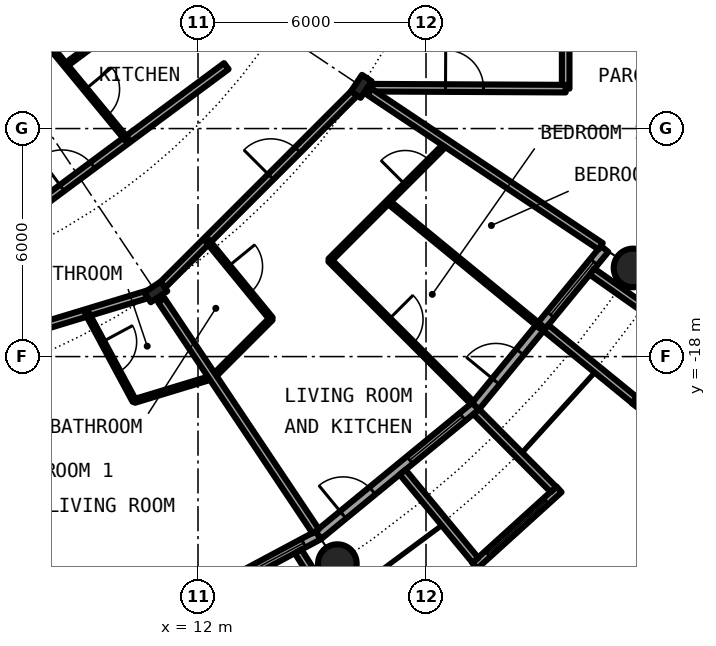
"""IFC4 building model, lengths in metres.
Left out: names, types, materials, properties, quantities, classifications, styles, units other than length and angle.
Written with IfcOpenShell. Run it as: python <this file> out.ifc"""

import sys

from ifc_helpers import new_model, si_unit, direction, frame, frame_2d, origin, origin_2d, place, context, subcontext, project, spatial, rectangle, circle, hollow_circle, i_section, extrude, element, fill, save


model = new_model("IFC4")
c1 = context("Model", 3, precision=1e-05, world=origin(), true_north=direction((0.0, 1.0)))
c2 = subcontext(c1, "Body", "Model", "MODEL_VIEW")
j1 = project(units=[si_unit("LENGTHUNIT", "METRE"), si_unit("PLANEANGLEUNIT", "RADIAN")], contexts=[c1])
p1 = place(None, origin())
s1 = spatial("IfcSite", under=j1, at=p1, CompositionType="ELEMENT")
p2 = place(p1, origin())
s2 = spatial("IfcBuilding", under=s1, at=p2, CompositionType="ELEMENT")
p3 = place(p2, frame((0.0, 0.0, 88.0)))
s3 = spatial("IfcBuildingStorey", under=s2, at=p3, CompositionType="ELEMENT", Elevation=88.0)
for number, where, z_axis, x_axis in (
    (1, (15.667, -23.448, 0.0), (0.0, 0.0, 1.0), (1.0, 0.0, 0.0)),
    (2, (23.448, -15.667, 0.0), (0.0, 0.0, 1.0), (1.0, 0.0, 0.0)),
):
    element("IfcColumn", number, at=place(p3, frame(where, z_axis=z_axis, x_axis=x_axis)), inside=s3, PredefinedType="COLUMN", context=c2, shape_type="SweptSolid", body=[
        extrude(hollow_circle(Radius=0.508, WallThickness=0.04, at=origin_2d()), origin(), (0.0, 0.0, 1.0), 3.05),
    ])
for number, where, z_axis, x_axis in (
    (3, (10.889, -16.297, 0.0), (0.0, 0.0, 1.0), (0.556, -0.831, 0.0)),
    (4, (16.297, -10.889, 0.0), (0.0, 0.0, 1.0), (0.831, -0.556, 0.0)),
):
    element("IfcColumn", number, at=place(p3, frame(where, z_axis=z_axis, x_axis=x_axis)), inside=s3, PredefinedType="COLUMN", context=c2, shape_type="SweptSolid", body=[
        extrude(i_section(OverallWidth=0.306, OverallDepth=0.524, WebThickness=0.021, FlangeThickness=0.04, FilletRadius=0.027, at=origin_2d()), origin(), (0.0, 0.0, 1.0), 3.05),
    ])
p4 = place(p3, frame((10.447, -25.222, 0.0), z_axis=(0.0, 0.0, 1.0), x_axis=(0.881915646801, 0.471407246368, 0.0)))
e5 = element("IfcWall", 5, at=p4, inside=s3, PredefinedType="SOLIDWALL", context=c2, shape_type="SweptSolid", body=[
    extrude(rectangle(XDim=5.352, YDim=0.25, at=frame_2d((2.676, 0.0))), origin(), (0.0, 0.0, 1.0), 2.7),
])
p5 = place(p4, frame((0.841, 0.0, 0.0)))
e6 = element("IfcOpeningElement", 6, at=p5, cuts=e5, PredefinedType="OPENING", context=c2, shape_type="SweptSolid", body=[
    extrude(rectangle(XDim=1.0, YDim=2.2, at=frame_2d((0.5, 1.1))), frame((0.0, 0.135, 0.0), z_axis=(0.0, -1.0, 0.0), x_axis=(1.0, 0.0, 0.0)), (0.0, 0.0, 1.0), 0.27),
])
p6 = place(p4, frame((3.111, 0.0, 0.3)))
e7 = element("IfcOpeningElement", 7, at=p6, cuts=e5, PredefinedType="OPENING", context=c2, shape_type="SweptSolid", body=[
    extrude(rectangle(XDim=1.8, YDim=2.1, at=frame_2d((0.9, 1.05))), frame((0.0, 0.135, 0.0), z_axis=(0.0, -1.0, 0.0), x_axis=(1.0, 0.0, 0.0)), (0.0, 0.0, 1.0), 0.27),
])
p7 = place(p3, frame((14.635, -23.126, -0.03), z_axis=(0.0, 0.0, 1.0), x_axis=(0.534437802731, -0.845207805816, 0.0)))
e8 = element("IfcWall", 8, at=p7, inside=s3, PredefinedType="SOLIDWALL", context=c2, shape_type="SweptSolid", body=[
    extrude(rectangle(XDim=2.932, YDim=0.2, at=frame_2d((1.466, 0.0))), origin(), (0.0, 0.0, 1.0), 2.73),
])
p8 = place(p3, frame((15.167, -22.699, 0.0), z_axis=(0.0, 0.0, 1.0), x_axis=(0.773019449054, 0.634382322723, 0.0)))
e9 = element("IfcWall", 9, at=p8, inside=s3, PredefinedType="SOLIDWALL", context=c2, shape_type="SweptSolid", body=[
    extrude(rectangle(XDim=5.352, YDim=0.25, at=frame_2d((2.676, 0.0))), origin(), (0.0, 0.0, 1.0), 2.7),
])
p9 = place(p8, frame((0.841, 0.0, 0.0)))
e10 = element("IfcOpeningElement", 10, at=p9, cuts=e9, PredefinedType="OPENING", context=c2, shape_type="SweptSolid", body=[
    extrude(rectangle(XDim=1.0, YDim=2.2, at=frame_2d((0.5, 1.1))), frame((0.0, 0.135, 0.0), z_axis=(0.0, -1.0, 0.0), x_axis=(1.0, 0.0, 0.0)), (0.0, 0.0, 1.0), 0.27),
])
p10 = place(p8, frame((3.111, 0.0, 0.3)))
e11 = element("IfcOpeningElement", 11, at=p10, cuts=e9, PredefinedType="OPENING", context=c2, shape_type="SweptSolid", body=[
    extrude(rectangle(XDim=1.8, YDim=2.1, at=frame_2d((0.9, 1.05))), frame((0.0, 0.135, 0.0), z_axis=(0.0, -1.0, 0.0), x_axis=(1.0, 0.0, 0.0)), (0.0, 0.0, 1.0), 0.27),
])
p11 = place(p3, frame((19.282, -23.503, -0.03), z_axis=(0.0, 0.0, 1.0), x_axis=(0.740998365753, 0.671506829416, 0.0)))
e12 = element("IfcWall", 12, at=p11, inside=s3, PredefinedType="SOLIDWALL", context=c2, shape_type="SweptSolid", body=[
    extrude(rectangle(XDim=2.993, YDim=0.2, at=frame_2d((1.497, 0.0))), origin(), (0.0, 0.0, 1.0), 2.73),
])
p12 = place(p11, frame((0.457, 0.0, 0.33)))
e13 = element("IfcOpeningElement", 13, at=p12, cuts=e12, PredefinedType="OPENING", context=c2, shape_type="SweptSolid", body=[
    extrude(circle(Radius=1.04, at=frame_2d((1.04, 1.04))), frame((0.0, 0.11, 0.0), z_axis=(0.0, -1.0, 0.0), x_axis=(1.0, 0.0, 0.0)), (0.0, 0.0, 1.0), 0.22),
])
p13 = place(p3, frame((17.384, -21.041, -0.03), z_axis=(0.0, 0.0, 1.0), x_axis=(0.63709551667, -0.770784861449, 0.0)))
e14 = element("IfcWall", 14, at=p13, inside=s3, PredefinedType="SOLIDWALL", context=c2, shape_type="SweptSolid", body=[
    extrude(rectangle(XDim=3.006, YDim=0.2, at=frame_2d((1.503, 0.0))), origin(), (0.0, 0.0, 1.0), 2.73),
])
p14 = place(p3, frame((19.323, -19.45, -0.03), z_axis=(0.0, 0.0, 1.0), x_axis=(0.704476739375, -0.709727076896, 0.0)))
e15 = element("IfcWall", 15, at=p14, inside=s3, PredefinedType="SOLIDWALL", context=c2, shape_type="SweptSolid", body=[
    extrude(rectangle(XDim=2.883, YDim=0.2, at=frame_2d((1.441, 0.0))), origin(), (0.0, 0.0, 1.0), 2.73),
])
p15 = place(p3, frame((19.304, -19.304, 0.0), z_axis=(0.0, 0.0, 1.0), x_axis=(0.634382322723, 0.773019449054, 0.0)))
e16 = element("IfcWall", 16, at=p15, inside=s3, PredefinedType="SOLIDWALL", context=c2, shape_type="SweptSolid", body=[
    extrude(rectangle(XDim=5.352, YDim=0.25, at=frame_2d((2.676, 0.0))), origin(), (0.0, 0.0, 1.0), 2.7),
])
p16 = place(p15, frame((0.841, 0.0, 0.0)))
e17 = element("IfcOpeningElement", 17, at=p16, cuts=e16, PredefinedType="OPENING", context=c2, shape_type="SweptSolid", body=[
    extrude(rectangle(XDim=1.0, YDim=2.2, at=frame_2d((0.5, 1.1))), frame((0.0, 0.135, 0.0), z_axis=(0.0, -1.0, 0.0), x_axis=(1.0, 0.0, 0.0)), (0.0, 0.0, 1.0), 0.27),
])
p17 = place(p15, frame((3.111, 0.0, 0.3)))
e18 = element("IfcOpeningElement", 18, at=p17, cuts=e16, PredefinedType="OPENING", context=c2, shape_type="SweptSolid", body=[
    extrude(rectangle(XDim=1.8, YDim=2.1, at=frame_2d((0.9, 1.05))), frame((0.0, 0.135, 0.0), z_axis=(0.0, -1.0, 0.0), x_axis=(1.0, 0.0, 0.0)), (0.0, 0.0, 1.0), 0.27),
])
p18 = place(p3, frame((23.497, -19.289, -0.03), z_axis=(0.0, 0.0, 1.0), x_axis=(0.60418752353, 0.796842165306, 0.0)))
e19 = element("IfcWall", 19, at=p18, inside=s3, PredefinedType="SOLIDWALL", context=c2, shape_type="SweptSolid", body=[
    extrude(rectangle(XDim=2.337, YDim=0.2, at=frame_2d((1.168, 0.0))), origin(), (0.0, 0.0, 1.0), 2.73),
])
p19 = place(p18, frame((0.128, 0.0, 0.33)))
e20 = element("IfcOpeningElement", 20, at=p19, cuts=e19, PredefinedType="OPENING", context=c2, shape_type="SweptSolid", body=[
    extrude(circle(Radius=1.04, at=frame_2d((1.04, 1.04))), frame((0.0, 0.11, 0.0), z_axis=(0.0, -1.0, 0.0), x_axis=(1.0, 0.0, 0.0)), (0.0, 0.0, 1.0), 0.22),
])
p20 = place(p3, frame((21.155, -17.246, -0.03), z_axis=(0.0, 0.0, 1.0), x_axis=(0.775179004516, -0.631741648902, 0.0)))
e21 = element("IfcWall", 21, at=p20, inside=s3, PredefinedType="SOLIDWALL", context=c2, shape_type="SweptSolid", body=[
    extrude(rectangle(XDim=3.006, YDim=0.2, at=frame_2d((1.503, 0.0))), origin(), (0.0, 0.0, 1.0), 2.73),
])
p21 = place(p3, frame((22.37, -15.765, -0.03), z_axis=(0.0, 0.0, 1.0), x_axis=(0.817256123454, -0.576274612209, 0.0)))
e22 = element("IfcWall", 22, at=p21, inside=s3, PredefinedType="SOLIDWALL", context=c2, shape_type="SweptSolid", body=[
    extrude(rectangle(XDim=2.933, YDim=0.2, at=frame_2d((1.466, 0.0))), origin(), (0.0, 0.0, 1.0), 2.73),
])
p22 = place(p3, frame((12.389, -18.542, 0.0), z_axis=(0.0, 0.0, 1.0), x_axis=(0.707106781187, 0.707106781187, 0.0)))
e23 = element("IfcWall", 23, at=p22, inside=s3, PredefinedType="PARTITIONING", context=c2, shape_type="SweptSolid", body=[
    extrude(rectangle(XDim=2.175, YDim=0.1, at=frame_2d((1.088, 0.0))), origin(), (0.0, 0.0, 1.0), 2.7),
])
p23 = place(p3, frame((15.468, -15.463, 0.0), z_axis=(0.0, 0.0, 1.0), x_axis=(0.707106781187, 0.707106781187, 0.0)))
e24 = element("IfcWall", 24, at=p23, inside=s3, PredefinedType="PARTITIONING", context=c2, shape_type="SweptSolid", body=[
    extrude(rectangle(XDim=4.351, YDim=0.1, at=frame_2d((2.176, 0.0))), origin(), (0.0, 0.0, 1.0), 2.7),
])
p24 = place(p23, frame((2.808, 0.0, 0.0)))
e25 = element("IfcOpeningElement", 25, at=p24, cuts=e24, PredefinedType="OPENING", context=c2, shape_type="SweptSolid", body=[
    extrude(rectangle(XDim=0.9, YDim=2.3, at=frame_2d((0.45, 1.15))), frame((0.0, 0.06, 0.0), z_axis=(0.0, -1.0, 0.0), x_axis=(1.0, 0.0, 0.0)), (0.0, 0.0, 1.0), 0.12),
])
p25 = place(p3, frame((21.675, -10.95, 0.0), z_axis=(0.0, 0.0, 1.0), x_axis=(0.0, 1.0, 0.0)))
e26 = element("IfcWall", 26, at=p25, inside=s3, PredefinedType="PARTITIONING", context=c2, shape_type="SweptSolid", body=[
    extrude(rectangle(XDim=1.65, YDim=0.2, at=frame_2d((0.825, 0.0))), origin(), (0.0, 0.0, 1.0), 2.7),
])
p26 = place(p3, frame((10.327, -19.168, 0.0), z_axis=(0.0, 0.0, 1.0), x_axis=(0.956877769253, 0.290490851335, 0.0)))
e27 = element("IfcWall", 27, at=p26, inside=s3, PredefinedType="PARTITIONING", context=c2, shape_type="SweptSolid", body=[
    extrude(rectangle(XDim=2.158, YDim=0.1, at=frame_2d((1.079, 0.0))), origin(), (0.0, 0.0, 1.0), 2.7),
])
p27 = place(p3, frame((11.0, -16.186, 0.0), z_axis=(0.0, 0.0, 1.0), x_axis=(0.707106781187, 0.707106781187, 0.0)))
e28 = element("IfcWall", 28, at=p27, inside=s3, PredefinedType="PARTITIONING", context=c2, shape_type="SweptSolid", body=[
    extrude(rectangle(XDim=7.334, YDim=0.2, at=frame_2d((3.667, 0.0))), origin(), (0.0, 0.0, 1.0), 2.38),
])
p28 = place(p27, frame((4.123, 0.0, 0.0)))
e29 = element("IfcOpeningElement", 29, at=p28, cuts=e28, PredefinedType="OPENING", context=c2, shape_type="SweptSolid", body=[
    extrude(rectangle(XDim=1.0, YDim=2.3, at=frame_2d((0.5, 1.15))), frame((0.0, 0.11, 0.0), z_axis=(0.0, -1.0, 0.0), x_axis=(1.0, 0.0, 0.0)), (0.0, 0.0, 1.0), 0.22),
])
p29 = place(p3, frame((0.0, -19.6, 0.0), z_axis=(0.0, 0.0, 1.0), x_axis=(0.956932298225, 0.290311172044, 0.0)))
e30 = element("IfcWall", 30, at=p29, inside=s3, PredefinedType="PARTITIONING", context=c2, shape_type="SweptSolid", body=[
    extrude(rectangle(XDim=11.219, YDim=0.2, at=frame_2d((5.61, 0.0))), origin(), (0.0, 0.0, 1.0), 2.38),
])
p30 = place(p29, frame((7.086, 0.0, 0.0)))
e31 = element("IfcOpeningElement", 31, at=p30, cuts=e30, PredefinedType="OPENING", context=c2, shape_type="SweptSolid", body=[
    extrude(rectangle(XDim=1.0, YDim=2.3, at=frame_2d((0.5, 1.15))), frame((0.0, 0.11, 0.0), z_axis=(0.0, -1.0, 0.0), x_axis=(1.0, 0.0, 0.0)), (0.0, 0.0, 1.0), 0.22),
])
p31 = place(p3, frame((4.906, -16.172, 0.0), z_axis=(0.0, 0.0, 1.0), x_axis=(0.803191461888, 0.595720971219, 0.0)))
e32 = element("IfcWall", 32, at=p31, inside=s3, PredefinedType="PARTITIONING", context=c2, shape_type="SweptSolid", body=[
    extrude(rectangle(XDim=9.76, YDim=0.2, at=frame_2d((4.88, 0.0))), origin(), (0.0, 0.0, 1.0), 2.7),
])
p32 = place(p31, frame((4.38, 0.0, 0.0)))
e33 = element("IfcOpeningElement", 33, at=p32, cuts=e32, PredefinedType="OPENING", context=c2, shape_type="SweptSolid", body=[
    extrude(rectangle(XDim=1.0, YDim=2.3, at=frame_2d((0.5, 1.15))), frame((0.0, 0.11, 0.0), z_axis=(0.0, -1.0, 0.0), x_axis=(1.0, 0.0, 0.0)), (0.0, 0.0, 1.0), 0.22),
])
p33 = place(p3, frame((8.513, -10.332, 0.0), z_axis=(0.0, 0.0, 1.0), x_axis=(0.803135014325, 0.595797070121, 0.0)))
e34 = element("IfcWall", 34, at=p33, inside=s3, PredefinedType="PARTITIONING", context=c2, shape_type="SweptSolid", body=[
    extrude(rectangle(XDim=1.732, YDim=0.1, at=frame_2d((0.866, 0.0))), origin(), (0.0, 0.0, 1.0), 2.7),
])
p34 = place(p3, frame((16.588, -10.925, 0.0), z_axis=(0.0, 0.0, 1.0), x_axis=(0.999988019025, -0.004895079807, 0.0)))
e35 = element("IfcWall", 35, at=p34, inside=s3, PredefinedType="PARTITIONING", context=c2, shape_type="SweptSolid", body=[
    extrude(rectangle(XDim=5.087, YDim=0.2, at=frame_2d((2.543, 0.0))), origin(), (0.0, 0.0, 1.0), 2.7),
])
p35 = place(p34, frame((1.925, 0.0, 0.0)))
e36 = element("IfcOpeningElement", 36, at=p35, cuts=e35, PredefinedType="OPENING", context=c2, shape_type="SweptSolid", body=[
    extrude(rectangle(XDim=1.0, YDim=2.3, at=frame_2d((0.5, 1.15))), frame((0.0, 0.11, 0.0), z_axis=(0.0, -1.0, 0.0), x_axis=(1.0, 0.0, 0.0)), (0.0, 0.0, 1.0), 0.22),
])
p36 = place(p3, frame((4.908, -5.959, 0.0), z_axis=(0.0, 0.0, 1.0), x_axis=(0.636105207978, -0.771602335652, 0.0)))
e37 = element("IfcWall", 37, at=p36, inside=s3, PredefinedType="PARTITIONING", context=c2, shape_type="SweptSolid", body=[
    extrude(rectangle(XDim=8.213, YDim=0.1, at=frame_2d((4.106, 0.0))), origin(), (0.0, 0.0, 1.0), 2.7),
])
p37 = place(p36, frame((6.49, 0.0, 0.0)))
e38 = element("IfcOpeningElement", 38, at=p37, cuts=e37, PredefinedType="OPENING", context=c2, shape_type="SweptSolid", body=[
    extrude(rectangle(XDim=0.9, YDim=2.3, at=frame_2d((0.45, 1.15))), frame((0.0, 0.06, 0.0), z_axis=(0.0, -1.0, 0.0), x_axis=(1.0, 0.0, 0.0)), (0.0, 0.0, 1.0), 0.12),
])
p38 = place(p36, frame((2.384, 0.0, 0.0)))
e39 = element("IfcOpeningElement", 39, at=p38, cuts=e37, PredefinedType="OPENING", context=c2, shape_type="SweptSolid", body=[
    extrude(rectangle(XDim=0.9, YDim=2.3, at=frame_2d((0.45, 1.15))), frame((0.0, 0.06, 0.0), z_axis=(0.0, -1.0, 0.0), x_axis=(1.0, 0.0, 0.0)), (0.0, 0.0, 1.0), 0.12),
])
p39 = place(p3, frame((9.074, -16.847, 0.0), z_axis=(0.0, 0.0, 1.0), x_axis=(0.474160570331, -0.880438387136, 0.0)))
e40 = element("IfcWall", 40, at=p39, inside=s3, PredefinedType="PARTITIONING", context=c2, shape_type="SweptSolid", body=[
    extrude(rectangle(XDim=2.636, YDim=0.1, at=frame_2d((1.318, 0.0))), origin(), (0.0, 0.0, 1.0), 2.7),
])
p40 = place(p39, frame((0.868, 0.0, 0.0)))
e41 = element("IfcOpeningElement", 41, at=p40, cuts=e40, PredefinedType="OPENING", context=c2, shape_type="SweptSolid", body=[
    extrude(rectangle(XDim=0.9, YDim=2.3, at=frame_2d((0.45, 1.15))), frame((0.0, 0.06, 0.0), z_axis=(0.0, -1.0, 0.0), x_axis=(1.0, 0.0, 0.0)), (0.0, 0.0, 1.0), 0.12),
])
p41 = place(p3, frame((11.034, -16.515, 0.0), z_axis=(0.0, 0.0, 1.0), x_axis=(0.555701298605, -0.831382022135, 0.0)))
e42 = element("IfcWall", 42, at=p41, inside=s3, PredefinedType="PARTITIONING", context=c2, shape_type="SweptSolid", body=[
    extrude(rectangle(XDim=7.313, YDim=0.2, at=frame_2d((3.657, 0.0))), origin(), (0.0, 0.0, 1.0), 2.7),
])
p42 = place(p3, frame((12.241, -14.945, 0.0), z_axis=(0.0, 0.0, 1.0), x_axis=(0.633582447834, -0.77367517848, 0.0)))
e43 = element("IfcWall", 43, at=p42, inside=s3, PredefinedType="PARTITIONING", context=c2, shape_type="SweptSolid", body=[
    extrude(rectangle(XDim=2.661, YDim=0.1, at=frame_2d((1.331, 0.0))), origin(), (0.0, 0.0, 1.0), 2.7),
])
p43 = place(p42, frame((0.881, 0.0, 0.0)))
e44 = element("IfcOpeningElement", 44, at=p43, cuts=e43, PredefinedType="OPENING", context=c2, shape_type="SweptSolid", body=[
    extrude(rectangle(XDim=0.9, YDim=2.3, at=frame_2d((0.45, 1.15))), frame((0.0, 0.06, 0.0), z_axis=(0.0, -1.0, 0.0), x_axis=(1.0, 0.0, 0.0)), (0.0, 0.0, 1.0), 0.12),
])
p44 = place(p3, frame((15.465, -15.465, 0.0), z_axis=(0.0, 0.0, 1.0), x_axis=(0.707106781187, -0.707106781187, 0.0)))
e45 = element("IfcWall", 45, at=p44, inside=s3, PredefinedType="PARTITIONING", context=c2, shape_type="SweptSolid", body=[
    extrude(rectangle(XDim=5.305, YDim=0.1, at=frame_2d((2.652, 0.0))), origin(), (0.0, 0.0, 1.0), 2.7),
])
p45 = place(p44, frame((2.202, 0.0, 0.0)))
e46 = element("IfcOpeningElement", 46, at=p45, cuts=e45, PredefinedType="OPENING", context=c2, shape_type="SweptSolid", body=[
    extrude(rectangle(XDim=0.9, YDim=2.3, at=frame_2d((0.45, 1.15))), frame((0.0, 0.06, 0.0), z_axis=(0.0, -1.0, 0.0), x_axis=(1.0, 0.0, 0.0)), (0.0, 0.0, 1.0), 0.12),
])
p46 = place(p3, frame((16.515, -11.035, 0.0), z_axis=(0.0, 0.0, 1.0), x_axis=(0.831505405283, -0.555516661303, 0.0)))
e47 = element("IfcWall", 47, at=p46, inside=s3, PredefinedType="PARTITIONING", context=c2, shape_type="SweptSolid", body=[
    extrude(rectangle(XDim=7.312, YDim=0.2, at=frame_2d((3.656, 0.0))), origin(), (0.0, 0.0, 1.0), 2.7),
])
p47 = place(p3, frame((17.004, -13.927, 0.0), z_axis=(0.0, 0.0, 1.0), x_axis=(0.773517471898, -0.633774976367, 0.0)))
e48 = element("IfcWall", 48, at=p47, inside=s3, PredefinedType="PARTITIONING", context=c2, shape_type="SweptSolid", body=[
    extrude(rectangle(XDim=5.196, YDim=0.1, at=frame_2d((2.598, 0.0))), origin(), (0.0, 0.0, 1.0), 2.7),
])
p48 = place(p6, origin())
e49 = element("IfcWindow", 49, at=p48, inside=s3, PartitioningType="SINGLE_PANEL", PredefinedType="WINDOW", context=c2, shape_type="SweptSolid", body=[
    extrude(rectangle(XDim=1.8, YDim=2.1, at=frame_2d((0.9, 1.05))), frame((0.0, 0.03, 0.0), z_axis=(0.0, -1.0, 0.0), x_axis=(1.0, 0.0, 0.0)), (0.0, 0.0, 1.0), 0.06),
])
fill(e7, e49)
p49 = place(p9, origin())
e50 = element("IfcDoor", 50, at=p49, inside=s3, OperationType="SINGLE_SWING_LEFT", PredefinedType="DOOR", context=c2, shape_type="SweptSolid", body=[
    extrude(rectangle(XDim=1.0, YDim=2.2, at=frame_2d((0.5, 1.1))), frame((0.0, 0.025, 0.0), z_axis=(0.0, -1.0, 0.0), x_axis=(1.0, 0.0, 0.0)), (0.0, 0.0, 1.0), 0.05),
])
fill(e10, e50)
p50 = place(p10, origin())
e51 = element("IfcWindow", 51, at=p50, inside=s3, PartitioningType="SINGLE_PANEL", PredefinedType="WINDOW", context=c2, shape_type="SweptSolid", body=[
    extrude(rectangle(XDim=1.8, YDim=2.1, at=frame_2d((0.9, 1.05))), frame((0.0, 0.03, 0.0), z_axis=(0.0, -1.0, 0.0), x_axis=(1.0, 0.0, 0.0)), (0.0, 0.0, 1.0), 0.06),
])
fill(e11, e51)
p51 = place(p12, origin())
e52 = element("IfcWindow", 52, at=p51, inside=s3, PartitioningType="SINGLE_PANEL", PredefinedType="WINDOW", context=c2, shape_type="SweptSolid", body=[
    extrude(circle(Radius=1.04, at=frame_2d((1.04, 1.04))), frame((0.0, 0.03, 0.0), z_axis=(0.0, -1.0, 0.0), x_axis=(1.0, 0.0, 0.0)), (0.0, 0.0, 1.0), 0.06),
])
fill(e13, e52)
p52 = place(p16, origin())
e53 = element("IfcDoor", 53, at=p52, inside=s3, OperationType="SINGLE_SWING_LEFT", PredefinedType="DOOR", context=c2, shape_type="SweptSolid", body=[
    extrude(rectangle(XDim=1.0, YDim=2.2, at=frame_2d((0.5, 1.1))), frame((0.0, 0.025, 0.0), z_axis=(0.0, -1.0, 0.0), x_axis=(1.0, 0.0, 0.0)), (0.0, 0.0, 1.0), 0.05),
])
fill(e17, e53)
p53 = place(p17, origin())
e54 = element("IfcWindow", 54, at=p53, inside=s3, PartitioningType="SINGLE_PANEL", PredefinedType="WINDOW", context=c2, shape_type="SweptSolid", body=[
    extrude(rectangle(XDim=1.8, YDim=2.1, at=frame_2d((0.9, 1.05))), frame((0.0, 0.03, 0.0), z_axis=(0.0, -1.0, 0.0), x_axis=(1.0, 0.0, 0.0)), (0.0, 0.0, 1.0), 0.06),
])
fill(e18, e54)
p54 = place(p40, origin())
e55 = element("IfcDoor", 55, at=p54, inside=s3, OperationType="SINGLE_SWING_RIGHT", PredefinedType="DOOR", context=c2, shape_type="SweptSolid", body=[
    extrude(rectangle(XDim=0.9, YDim=2.3, at=frame_2d((0.45, 1.15))), frame((0.0, 0.025, 0.0), z_axis=(0.0, -1.0, 0.0), x_axis=(1.0, 0.0, 0.0)), (0.0, 0.0, 1.0), 0.05),
])
fill(e41, e55)
p55 = place(p28, origin())
e56 = element("IfcDoor", 56, at=p55, inside=s3, OperationType="SINGLE_SWING_RIGHT", PredefinedType="DOOR", context=c2, shape_type="SweptSolid", body=[
    extrude(rectangle(XDim=1.0, YDim=2.3, at=frame_2d((0.5, 1.15))), frame((0.0, 0.025, 0.0), z_axis=(0.0, -1.0, 0.0), x_axis=(1.0, 0.0, 0.0)), (0.0, 0.0, 1.0), 0.05),
])
fill(e29, e56)
p56 = place(p43, origin())
e57 = element("IfcDoor", 57, at=p56, inside=s3, OperationType="SINGLE_SWING_LEFT", PredefinedType="DOOR", context=c2, shape_type="SweptSolid", body=[
    extrude(rectangle(XDim=0.9, YDim=2.3, at=frame_2d((0.45, 1.15))), frame((0.0, 0.025, 0.0), z_axis=(0.0, -1.0, 0.0), x_axis=(1.0, 0.0, 0.0)), (0.0, 0.0, 1.0), 0.05),
])
fill(e44, e57)
p57 = place(p45, origin())
e58 = element("IfcDoor", 58, at=p57, inside=s3, OperationType="SINGLE_SWING_RIGHT", PredefinedType="DOOR", context=c2, shape_type="SweptSolid", body=[
    extrude(rectangle(XDim=0.9, YDim=2.3, at=frame_2d((0.45, 1.15))), frame((0.0, 0.025, 0.0), z_axis=(0.0, -1.0, 0.0), x_axis=(1.0, 0.0, 0.0)), (0.0, 0.0, 1.0), 0.05),
])
fill(e46, e58)
p58 = place(p24, origin())
e59 = element("IfcDoor", 59, at=p58, inside=s3, OperationType="SINGLE_SWING_RIGHT", PredefinedType="DOOR", context=c2, shape_type="SweptSolid", body=[
    extrude(rectangle(XDim=0.9, YDim=2.3, at=frame_2d((0.45, 1.15))), frame((0.0, 0.025, 0.0), z_axis=(0.0, -1.0, 0.0), x_axis=(1.0, 0.0, 0.0)), (0.0, 0.0, 1.0), 0.05),
])
fill(e25, e59)
p59 = place(p32, origin())
e60 = element("IfcDoor", 60, at=p59, inside=s3, OperationType="SINGLE_SWING_LEFT", PredefinedType="DOOR", context=c2, shape_type="SweptSolid", body=[
    extrude(rectangle(XDim=1.0, YDim=2.3, at=frame_2d((0.5, 1.15))), frame((0.0, 0.025, 0.0), z_axis=(0.0, -1.0, 0.0), x_axis=(1.0, 0.0, 0.0)), (0.0, 0.0, 1.0), 0.05),
])
fill(e33, e60)
p60 = place(p37, origin())
e61 = element("IfcDoor", 61, at=p60, inside=s3, OperationType="SINGLE_SWING_RIGHT", PredefinedType="DOOR", context=c2, shape_type="SweptSolid", body=[
    extrude(rectangle(XDim=0.9, YDim=2.3, at=frame_2d((0.45, 1.15))), frame((0.0, 0.025, 0.0), z_axis=(0.0, -1.0, 0.0), x_axis=(1.0, 0.0, 0.0)), (0.0, 0.0, 1.0), 0.05),
])
fill(e38, e61)
p61 = place(p35, origin())
e62 = element("IfcDoor", 62, at=p61, inside=s3, OperationType="SINGLE_SWING_LEFT", PredefinedType="DOOR", context=c2, shape_type="SweptSolid", body=[
    extrude(rectangle(XDim=1.0, YDim=2.3, at=frame_2d((0.5, 1.15))), frame((0.0, 0.025, 0.0), z_axis=(0.0, -1.0, 0.0), x_axis=(1.0, 0.0, 0.0)), (0.0, 0.0, 1.0), 0.05),
])
fill(e36, e62)
save(model, sys.argv[1])
